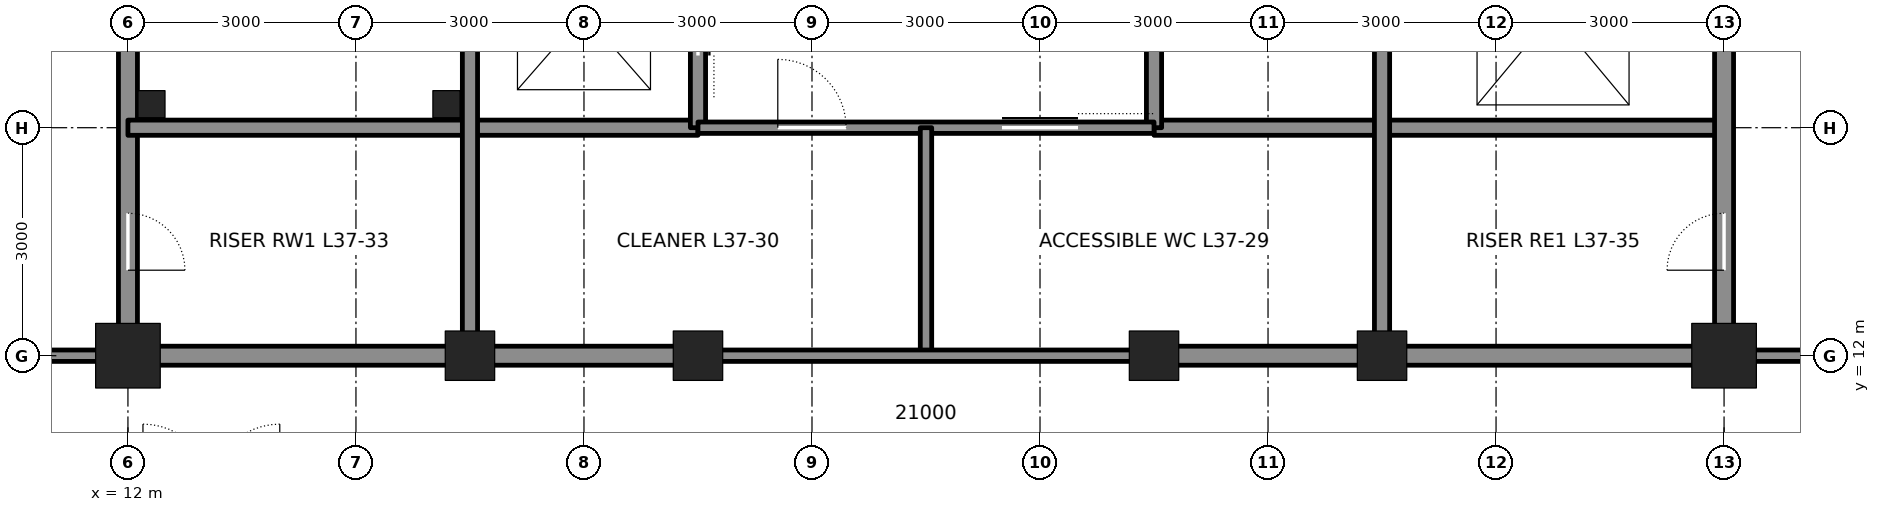
"""IFC4 building model, lengths in metres.
Left out: names, types, materials, properties, quantities, classifications, styles, units other than length and angle.
Written with IfcOpenShell. Run it as: python <this file> out.ifc"""

import sys

from ifc_helpers import new_model, si_unit, direction, frame, frame_2d, origin, origin_2d, place, context, subcontext, project, spatial, rectangle, hollow_rectangle, extrude, element, fill, save


model = new_model("IFC4")
c1 = context("Model", 3, precision=1e-05, world=origin(), true_north=direction((0.0, 1.0)))
c2 = subcontext(c1, "Body", "Model", "MODEL_VIEW")
j1 = project(units=[si_unit("LENGTHUNIT", "METRE"), si_unit("PLANEANGLEUNIT", "RADIAN")], contexts=[c1])
p1 = place(None, origin())
s1 = spatial("IfcSite", under=j1, at=p1, CompositionType="ELEMENT")
p2 = place(p1, origin())
s2 = spatial("IfcBuilding", under=s1, at=p2, CompositionType="ELEMENT")
p3 = place(p2, frame((0.0, 0.0, 169.8)))
s3 = spatial("IfcBuildingStorey", under=s2, at=p3, CompositionType="ELEMENT", Elevation=169.8)
p4 = place(p3, frame((12.0, 12.0, 0.0), z_axis=(0.0, 0.0, 1.0), x_axis=(1.0, 0.0, 0.0)))
e1 = element("IfcColumn", 1, at=p4, inside=s3, PredefinedType="COLUMN", context=c2, shape_type="SweptSolid", body=[
    extrude(hollow_rectangle(XDim=0.85, YDim=0.85, WallThickness=0.085, at=origin_2d()), origin(), (0.0, 0.0, 1.0), 4.2),
])
for number, where, z_axis, x_axis in (
    (2, (16.5, 12.0, 0.0), (0.0, 0.0, 1.0), (1.0, 0.0, 0.0)),
    (3, (19.5, 12.0, 0.0), (0.0, 0.0, 1.0), (1.0, 0.0, 0.0)),
    (4, (25.5, 12.0, 0.0), (0.0, 0.0, 1.0), (1.0, 0.0, 0.0)),
    (5, (28.5, 12.0, 0.0), (0.0, 0.0, 1.0), (1.0, 0.0, 0.0)),
):
    element("IfcColumn", number, at=place(p3, frame(where, z_axis=z_axis, x_axis=x_axis)), inside=s3, PredefinedType="COLUMN", context=c2, shape_type="SweptSolid", body=[
        extrude(hollow_rectangle(XDim=0.65, YDim=0.65, WallThickness=0.065, at=origin_2d()), origin(), (0.0, 0.0, 1.0), 4.2),
    ])
p5 = place(p3, frame((33.0, 12.0, 0.0), z_axis=(0.0, 0.0, 1.0), x_axis=(1.0, 0.0, 0.0)))
e6 = element("IfcColumn", 6, at=p5, inside=s3, PredefinedType="COLUMN", context=c2, shape_type="SweptSolid", body=[
    extrude(hollow_rectangle(XDim=0.85, YDim=0.85, WallThickness=0.085, at=origin_2d()), origin(), (0.0, 0.0, 1.0), 4.2),
])
p6 = place(p3, frame((12.0, 12.25, 0.0), z_axis=(0.0, 0.0, 1.0), x_axis=(0.0, 1.0, 0.0)))
e7 = element("IfcWall", 7, at=p6, inside=s3, PredefinedType="SOLIDWALL", context=c2, shape_type="SweptSolid", body=[
    extrude(rectangle(XDim=8.5, YDim=0.25, at=frame_2d((4.25, 0.0))), origin(), (0.0, 0.0, 1.0), 3.113),
])
p7 = place(p6, frame((0.875, 0.0, 0.0)))
e8 = element("IfcOpeningElement", 8, at=p7, cuts=e7, PredefinedType="OPENING", context=c2, shape_type="SweptSolid", body=[
    extrude(rectangle(XDim=0.75, YDim=2.1, at=frame_2d((0.375, 1.05))), frame((0.0, 0.135, 0.0), z_axis=(0.0, -1.0, 0.0), x_axis=(1.0, 0.0, 0.0)), (0.0, 0.0, 1.0), 0.27),
])
p8 = place(p3, frame((12.25, 12.0, 0.0), z_axis=(0.0, 0.0, 1.0), x_axis=(1.0, 0.0, 0.0)))
e9 = element("IfcWall", 9, at=p8, inside=s3, PredefinedType="SOLIDWALL", context=c2, shape_type="SweptSolid", body=[
    extrude(rectangle(XDim=4.0, YDim=0.25, at=frame_2d((2.0, 0.0))), origin(), (0.0, 0.0, 1.0), 3.181),
])
for number, where, z_axis, x_axis in (
    (10, (16.75, 12.0, 0.0), (0.0, 0.0, 1.0), (1.0, 0.0, 0.0)),
    (11, (25.75, 12.0, 0.0), (0.0, 0.0, 1.0), (1.0, 0.0, 0.0)),
):
    element("IfcWall", number, at=place(p3, frame(where, z_axis=z_axis, x_axis=x_axis)), inside=s3, PredefinedType="SOLIDWALL", context=c2, shape_type="SweptSolid", body=[
        extrude(rectangle(XDim=2.5, YDim=0.25, at=frame_2d((1.25, 0.0))), origin(), (0.0, 0.0, 1.0), 3.181),
    ])
p9 = place(p3, frame((28.75, 12.0, 0.0), z_axis=(0.0, 0.0, 1.0), x_axis=(1.0, 0.0, 0.0)))
e12 = element("IfcWall", 12, at=p9, inside=s3, PredefinedType="SOLIDWALL", context=c2, shape_type="SweptSolid", body=[
    extrude(rectangle(XDim=4.0, YDim=0.25, at=frame_2d((2.0, 0.0))), origin(), (0.0, 0.0, 1.0), 3.181),
])
for number, where, z_axis, x_axis in (
    (13, (12.0, 15.0, 0.0), (0.0, 0.0, 1.0), (1.0, 0.0, 0.0)),
    (14, (25.5, 15.0, 0.0), (0.0, 0.0, 1.0), (1.0, 0.0, 0.0)),
):
    element("IfcWall", number, at=place(p3, frame(where, z_axis=z_axis, x_axis=x_axis)), inside=s3, PredefinedType="SOLIDWALL", context=c2, shape_type="SweptSolid", body=[
        extrude(rectangle(XDim=7.5, YDim=0.2, at=frame_2d((3.75, 0.0))), origin(), (0.0, 0.0, 1.0), 4.04),
    ])
p10 = place(p3, frame((16.5, 12.25, 0.0), z_axis=(0.0, 0.0, 1.0), x_axis=(0.0, 1.0, 0.0)))
e15 = element("IfcWall", 15, at=p10, inside=s3, PredefinedType="SOLIDWALL", context=c2, shape_type="SweptSolid", body=[
    extrude(rectangle(XDim=8.5, YDim=0.2, at=frame_2d((4.25, 0.0))), origin(), (0.0, 0.0, 1.0), 3.113),
])
p11 = place(p3, frame((19.5, 15.0, 0.0), z_axis=(0.0, 0.0, 1.0), x_axis=(0.0, 1.0, 0.0)))
e16 = element("IfcWall", 16, at=p11, inside=s3, PredefinedType="SOLIDWALL", context=c2, shape_type="SweptSolid", body=[
    extrude(rectangle(XDim=12.0, YDim=0.2, at=frame_2d((6.0, 0.0))), origin(), (0.0, 0.0, 1.0), 3.064),
])
p12 = place(p11, frame((0.95, 0.0, 0.0)))
e17 = element("IfcOpeningElement", 17, at=p12, cuts=e16, PredefinedType="OPENING", context=c2, shape_type="SweptSolid", body=[
    extrude(rectangle(XDim=1.1, YDim=2.1, at=frame_2d((0.55, 1.05))), frame((0.0, 0.11, 0.0), z_axis=(0.0, -1.0, 0.0), x_axis=(1.0, 0.0, 0.0)), (0.0, 0.0, 1.0), 0.22),
])
p13 = place(p11, frame((3.95, 0.0, 0.0)))
e18 = element("IfcOpeningElement", 18, at=p13, cuts=e16, PredefinedType="OPENING", context=c2, shape_type="SweptSolid", body=[
    extrude(rectangle(XDim=1.1, YDim=2.1, at=frame_2d((0.55, 1.05))), frame((0.0, 0.11, 0.0), z_axis=(0.0, -1.0, 0.0), x_axis=(1.0, 0.0, 0.0)), (0.0, 0.0, 1.0), 0.22),
])
p14 = place(p11, frame((6.95, 0.0, 0.0)))
e19 = element("IfcOpeningElement", 19, at=p14, cuts=e16, PredefinedType="OPENING", context=c2, shape_type="SweptSolid", body=[
    extrude(rectangle(XDim=1.1, YDim=2.1, at=frame_2d((0.55, 1.05))), frame((0.0, 0.11, 0.0), z_axis=(0.0, -1.0, 0.0), x_axis=(1.0, 0.0, 0.0)), (0.0, 0.0, 1.0), 0.22),
])
p15 = place(p11, frame((9.95, 0.0, 0.0)))
e20 = element("IfcOpeningElement", 20, at=p15, cuts=e16, PredefinedType="OPENING", context=c2, shape_type="SweptSolid", body=[
    extrude(rectangle(XDim=1.1, YDim=2.1, at=frame_2d((0.55, 1.05))), frame((0.0, 0.11, 0.0), z_axis=(0.0, -1.0, 0.0), x_axis=(1.0, 0.0, 0.0)), (0.0, 0.0, 1.0), 0.22),
])
p16 = place(p3, frame((25.5, 15.0, 0.0), z_axis=(0.0, 0.0, 1.0), x_axis=(0.0, 1.0, 0.0)))
e21 = element("IfcWall", 21, at=p16, inside=s3, PredefinedType="SOLIDWALL", context=c2, shape_type="SweptSolid", body=[
    extrude(rectangle(XDim=12.0, YDim=0.2, at=frame_2d((6.0, 0.0))), origin(), (0.0, 0.0, 1.0), 3.064),
])
p17 = place(p3, frame((28.5, 12.25, 0.0), z_axis=(0.0, 0.0, 1.0), x_axis=(0.0, 1.0, 0.0)))
e22 = element("IfcWall", 22, at=p17, inside=s3, PredefinedType="SOLIDWALL", context=c2, shape_type="SweptSolid", body=[
    extrude(rectangle(XDim=8.5, YDim=0.2, at=frame_2d((4.25, 0.0))), origin(), (0.0, 0.0, 1.0), 3.113),
])
p18 = place(p3, frame((33.0, 12.25, 0.0), z_axis=(0.0, 0.0, 1.0), x_axis=(0.0, 1.0, 0.0)))
e23 = element("IfcWall", 23, at=p18, inside=s3, PredefinedType="SOLIDWALL", context=c2, shape_type="SweptSolid", body=[
    extrude(rectangle(XDim=8.5, YDim=0.25, at=frame_2d((4.25, 0.0))), origin(), (0.0, 0.0, 1.0), 3.113),
])
p19 = place(p18, frame((6.65, 0.0, 0.0)))
e24 = element("IfcOpeningElement", 24, at=p19, cuts=e23, PredefinedType="OPENING", context=c2, shape_type="SweptSolid", body=[
    extrude(rectangle(XDim=1.2, YDim=2.1, at=frame_2d((0.6, 1.05))), frame((0.0, 0.135, 0.0), z_axis=(0.0, -1.0, 0.0), x_axis=(1.0, 0.0, 0.0)), (0.0, 0.0, 1.0), 0.27),
])
p20 = place(p18, frame((0.875, 0.0, 0.0)))
e25 = element("IfcOpeningElement", 25, at=p20, cuts=e23, PredefinedType="OPENING", context=c2, shape_type="SweptSolid", body=[
    extrude(rectangle(XDim=0.75, YDim=2.1, at=frame_2d((0.375, 1.05))), frame((0.0, 0.135, 0.0), z_axis=(0.0, -1.0, 0.0), x_axis=(1.0, 0.0, 0.0)), (0.0, 0.0, 1.0), 0.27),
])
p21 = place(p3, frame((19.5, 15.0, 0.0), z_axis=(0.0, 0.0, 1.0), x_axis=(1.0, 0.0, 0.0)))
e26 = element("IfcWall", 26, at=p21, inside=s3, PredefinedType="PARTITIONING", context=c2, shape_type="SweptSolid", body=[
    extrude(rectangle(XDim=6.0, YDim=0.15, at=frame_2d((3.0, 0.0))), origin(), (0.0, 0.0, 1.0), 4.04),
])
p22 = place(p21, frame((4.0, 0.0, 0.0)))
e27 = element("IfcOpeningElement", 27, at=p22, cuts=e26, PredefinedType="OPENING", context=c2, shape_type="SweptSolid", body=[
    extrude(rectangle(XDim=1.0, YDim=2.1, at=frame_2d((0.5, 1.05))), frame((0.0, 0.085, 0.0), z_axis=(0.0, -1.0, 0.0), x_axis=(1.0, 0.0, 0.0)), (0.0, 0.0, 1.0), 0.17),
])
p23 = place(p21, frame((1.05, 0.0, 0.0)))
e28 = element("IfcOpeningElement", 28, at=p23, cuts=e26, PredefinedType="OPENING", context=c2, shape_type="SweptSolid", body=[
    extrude(rectangle(XDim=0.9, YDim=2.1, at=frame_2d((0.45, 1.05))), frame((0.0, 0.085, 0.0), z_axis=(0.0, -1.0, 0.0), x_axis=(1.0, 0.0, 0.0)), (0.0, 0.0, 1.0), 0.17),
])
p24 = place(p3, frame((22.5, 15.0, 0.0), z_axis=(0.0, 0.0, 1.0), x_axis=(0.0, -1.0, 0.0)))
e29 = element("IfcWall", 29, at=p24, inside=s3, PredefinedType="PARTITIONING", context=c2, shape_type="SweptSolid", body=[
    extrude(rectangle(XDim=3.0, YDim=0.15, at=frame_2d((1.5, 0.0))), origin(), (0.0, 0.0, 1.0), 4.04),
])
p25 = place(p3, frame((19.5, 12.0, 0.0), z_axis=(0.0, 0.0, 1.0), x_axis=(1.0, 0.0, 0.0)))
e30 = element("IfcWall", 30, at=p25, inside=s3, PredefinedType="PARTITIONING", context=c2, shape_type="SweptSolid", body=[
    extrude(rectangle(XDim=6.0, YDim=0.15, at=frame_2d((3.0, 0.0))), origin(), (0.0, 0.0, 1.0), 3.181),
])
for number, where, z_axis, x_axis in (
    (31, (10.2, 12.0, 0.0), (0.0, 0.0, 1.0), (1.0, 0.0, 0.0)),
    (32, (33.0, 12.0, 0.0), (0.0, 0.0, 1.0), (1.0, 0.0, 0.0)),
):
    element("IfcWall", number, at=place(p3, frame(where, z_axis=z_axis, x_axis=x_axis)), inside=s3, PredefinedType="PARTITIONING", context=c2, shape_type="SweptSolid", body=[
        extrude(rectangle(XDim=1.8, YDim=0.15, at=frame_2d((0.9, 0.0))), origin(), (0.0, 0.0, 1.0), 3.093),
    ])
for number, where, z_axis, x_axis in (
    (33, (12.31, 15.31, 0.0), (0.0, 0.0, 1.0), (1.0, 0.0, 0.0)),
    (34, (16.19, 15.31, 0.0), (0.0, 0.0, 1.0), (1.0, 0.0, 0.0)),
):
    element("IfcColumn", number, at=place(p3, frame(where, z_axis=z_axis, x_axis=x_axis)), inside=s3, PredefinedType="COLUMN", context=c2, shape_type="SweptSolid", body=[
        extrude(hollow_rectangle(XDim=0.356, YDim=0.356, WallThickness=0.015, at=origin_2d()), origin(), (0.0, 0.0, 1.0), 4.2),
    ])
p26 = place(p7, frame((0.75, 0.0, 0.0), z_axis=(0.0, 0.0, 1.0), x_axis=(-1.0, 0.0, 0.0)))
e35 = element("IfcDoor", 35, at=p26, inside=s3, OperationType="SINGLE_SWING_RIGHT", PredefinedType="DOOR", context=c2, shape_type="SweptSolid", body=[
    extrude(rectangle(XDim=0.75, YDim=2.1, at=frame_2d((0.375, 1.05))), frame((0.0, 0.025, 0.0), z_axis=(0.0, -1.0, 0.0), x_axis=(1.0, 0.0, 0.0)), (0.0, 0.0, 1.0), 0.05),
])
fill(e8, e35)
p27 = place(p20, origin())
e36 = element("IfcDoor", 36, at=p27, inside=s3, OperationType="SINGLE_SWING_LEFT", PredefinedType="DOOR", context=c2, shape_type="SweptSolid", body=[
    extrude(rectangle(XDim=0.75, YDim=2.1, at=frame_2d((0.375, 1.05))), frame((0.0, 0.025, 0.0), z_axis=(0.0, -1.0, 0.0), x_axis=(1.0, 0.0, 0.0)), (0.0, 0.0, 1.0), 0.05),
])
fill(e25, e36)
p28 = place(p22, origin())
e37 = element("IfcDoor", 37, at=p28, inside=s3, OperationType="SLIDING_TO_LEFT", PredefinedType="DOOR", context=c2, shape_type="SweptSolid", body=[
    extrude(rectangle(XDim=1.0, YDim=2.1, at=frame_2d((0.5, 1.05))), frame((0.0, 0.025, 0.0), z_axis=(0.0, -1.0, 0.0), x_axis=(1.0, 0.0, 0.0)), (0.0, 0.0, 1.0), 0.05),
])
fill(e27, e37)
p29 = place(p23, origin())
e38 = element("IfcDoor", 38, at=p29, inside=s3, OperationType="SINGLE_SWING_LEFT", PredefinedType="DOOR", context=c2, shape_type="SweptSolid", body=[
    extrude(rectangle(XDim=0.9, YDim=2.1, at=frame_2d((0.45, 1.05))), frame((0.0, 0.025, 0.0), z_axis=(0.0, -1.0, 0.0), x_axis=(1.0, 0.0, 0.0)), (0.0, 0.0, 1.0), 0.05),
])
fill(e28, e38)
p30 = place(p12, origin())
e39 = element("IfcDoor", 39, at=p30, inside=s3, OperationType="DOUBLE_DOOR_SLIDING", PredefinedType="DOOR", context=c2, shape_type="SweptSolid", body=[
    extrude(rectangle(XDim=1.1, YDim=2.1, at=frame_2d((0.55, 1.05))), frame((0.0, 0.025, 0.0), z_axis=(0.0, -1.0, 0.0), x_axis=(1.0, 0.0, 0.0)), (0.0, 0.0, 1.0), 0.05),
])
fill(e17, e39)
save(model, sys.argv[1])
